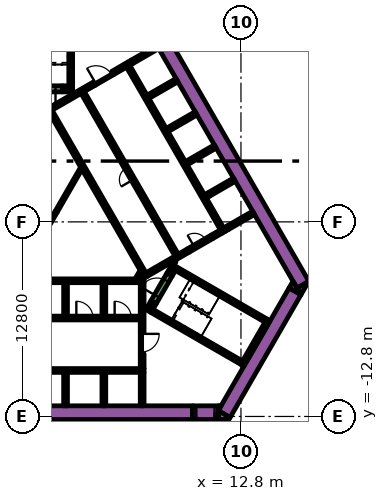
"""IFC4 building model, lengths in metres.
Left out: names, types, materials, properties, quantities, classifications, styles, units other than length and angle.
Written with IfcOpenShell. Run it as: python <this file> out.ifc"""

import sys

from ifc_helpers import new_model, si_unit, direction, frame, frame_2d, origin, place, context, subcontext, project, spatial, polyline, rectangle, outline, extrude, element, fill, save


model = new_model("IFC4")
c1 = context("Model", 3, precision=1e-05, world=origin(), true_north=direction((0.0, 1.0)))
c2 = subcontext(c1, "Body", "Model", "MODEL_VIEW")
j1 = project(units=[si_unit("LENGTHUNIT", "METRE"), si_unit("PLANEANGLEUNIT", "RADIAN")], contexts=[c1])
p1 = place(None, origin())
s1 = spatial("IfcSite", under=j1, at=p1, CompositionType="ELEMENT")
p2 = place(p1, origin())
s2 = spatial("IfcBuilding", under=s1, at=p2, CompositionType="ELEMENT")
p3 = place(p2, frame((0.0, 0.0, 6.0)))
s3 = spatial("IfcBuildingStorey", under=s2, at=p3, CompositionType="ELEMENT", Elevation=6.0)
p4 = place(p3, frame((6.776, 13.364, 0.0), z_axis=(0.0, 0.0, 1.0), x_axis=(0.500004177138, -0.8660229921, 0.0)))
e1 = element("IfcWall", 1, at=p4, inside=s3, PredefinedType="SOLIDWALL", context=c2, shape_type="SweptSolid", body=[
    extrude(rectangle(XDim=20.204, YDim=0.9, at=frame_2d((10.102, 0.0))), origin(), (0.0, 0.0, 1.0), 5.4),
])
p5 = place(p3, origin())
e2 = element("IfcWall", 2, at=p5, inside=s3, PredefinedType="SOLIDWALL", context=c2, shape_type="SweptSolid", body=[
    extrude(outline(polyline([(16.743, -4.8), (16.489, -4.36), (17.251, -3.92), (16.743, -4.8)])), origin(), (0.0, 0.0, 1.0), 5.4),
])
p6 = place(p3, frame((11.695, -12.644, 0.0), z_axis=(0.0, 0.0, 1.0), x_axis=(0.500010229568, 0.86601949766, 0.0)))
e3 = element("IfcWall", 3, at=p6, inside=s3, PredefinedType="SOLIDWALL", context=c2, shape_type="SweptSolid", body=[
    extrude(rectangle(XDim=9.326, YDim=0.9, at=frame_2d((4.663, 0.0))), origin(), (0.0, 0.0, 1.0), 5.4),
])
e4 = element("IfcWall", 4, at=p5, inside=s3, PredefinedType="SOLIDWALL", context=c2, shape_type="SweptSolid", body=[
    extrude(outline(polyline([(12.009, -13.0), (11.312, -13.0), (11.312, -12.425), (12.083, -12.871), (12.009, -13.0)])), origin(), (0.0, 0.0, 1.0), 5.4),
])
e5 = element("IfcWall", 5, at=p5, inside=s3, PredefinedType="SOLIDWALL", context=c2, shape_type="SweptSolid", body=[
    extrude(outline(polyline([(16.223, -3.9), (16.732, -4.78), (15.969, -4.34), (16.223, -3.9)])), origin(), (0.0, 0.0, 1.0), 5.4),
])
e6 = element("IfcWall", 6, at=p5, inside=s3, PredefinedType="SOLIDWALL", context=c2, shape_type="SweptSolid", body=[
    extrude(outline(polyline([(11.489, -12.1), (11.312, -12.407), (11.312, -12.1), (11.489, -12.1)])), origin(), (0.0, 0.0, 1.0), 5.4),
])
p7 = place(p3, frame((-12.019, -12.55, 0.0), z_axis=(0.0, 0.0, 1.0), x_axis=(1.0, 0.0, 0.0)))
e7 = element("IfcWall", 7, at=p7, inside=s3, PredefinedType="SOLIDWALL", context=c2, shape_type="SweptSolid", body=[
    extrude(rectangle(XDim=21.63, YDim=0.9, at=frame_2d((10.815, 0.0))), origin(), (0.0, 0.0, 1.0), 5.4),
])
p8 = place(p3, frame((12.885, -9.431, 0.0), z_axis=(0.0, 0.0, 1.0), x_axis=(0.500020560727, 0.866013532718, 0.0)))
e8 = element("IfcWall", 8, at=p8, inside=s3, PredefinedType="SOLIDWALL", context=c2, shape_type="SweptSolid", body=[
    extrude(rectangle(XDim=3.45, YDim=0.25, at=frame_2d((1.725, 0.0))), origin(), (0.0, 0.0, 1.0), 5.4),
])
p9 = place(p3, frame((12.84, -9.261, 0.0), z_axis=(0.0, 0.0, 1.0), x_axis=(-0.866013990052, 0.500019768644, 0.0)))
e9 = element("IfcWall", 9, at=p9, inside=s3, PredefinedType="SOLIDWALL", context=c2, shape_type="SweptSolid", body=[
    extrude(rectangle(XDim=6.8, YDim=0.25, at=frame_2d((3.4, 0.0))), origin(), (0.0, 0.0, 1.0), 5.4),
])
p10 = place(p3, frame((6.78, -5.906, 0.0), z_axis=(0.0, 0.0, 1.0), x_axis=(0.500223362819, 0.865896406789, 0.0)))
e10 = element("IfcWall", 10, at=p10, inside=s3, PredefinedType="SOLIDWALL", context=c2, shape_type="SweptSolid", body=[
    extrude(rectangle(XDim=0.675, YDim=0.25, at=frame_2d((0.337, 0.0))), origin(), (0.0, 0.0, 1.0), 5.4),
])
p11 = place(p3, frame((8.334, -2.964, 0.0), z_axis=(0.0, 0.0, 1.0), x_axis=(0.866016039709, -0.500016218704, 0.0)))
e11 = element("IfcWall", 11, at=p11, inside=s3, PredefinedType="SOLIDWALL", context=c2, shape_type="SweptSolid", body=[
    extrude(rectangle(XDim=7.05, YDim=0.25, at=frame_2d((3.525, 0.0))), origin(), (0.0, 0.0, 1.0), 5.4),
])
p12 = place(p3, frame((8.168, -3.503, 0.0), z_axis=(0.0, 0.0, 1.0), x_axis=(0.49972245349, 0.866185586049, 0.0)))
e12 = element("IfcWall", 12, at=p12, inside=s3, PredefinedType="SOLIDWALL", context=c2, shape_type="SweptSolid", body=[
    extrude(rectangle(XDim=0.425, YDim=0.25, at=frame_2d((0.212, 0.0))), origin(), (0.0, 0.0, 1.0), 5.4),
])
p13 = place(p3, frame((1.6, 8.95, 0.0), z_axis=(0.0, 0.0, 1.0), x_axis=(0.0, 1.0, 0.0)))
e13 = element("IfcWall", 13, at=p13, inside=s3, PredefinedType="SOLIDWALL", context=c2, shape_type="SweptSolid", body=[
    extrude(rectangle(XDim=6.8, YDim=0.25, at=frame_2d((3.4, 0.0))), origin(), (0.0, 0.0, 1.0), 5.4),
])
p14 = place(p3, frame((1.05, 8.825, 0.0), z_axis=(0.0, 0.0, 1.0), x_axis=(1.0, 0.0, 0.0)))
e14 = element("IfcWall", 14, at=p14, inside=s3, PredefinedType="SOLIDWALL", context=c2, shape_type="SweptSolid", body=[
    extrude(rectangle(XDim=0.675, YDim=0.25, at=frame_2d((0.337, 0.0))), origin(), (0.0, 0.0, 1.0), 5.4),
])
p15 = place(p3, frame((-6.425, -9.775, 0.0), z_axis=(0.0, 0.0, 1.0), x_axis=(1.0, 0.0, 0.0)))
e15 = element("IfcWall", 15, at=p15, inside=s3, PredefinedType="SOLIDWALL", context=c2, shape_type="SweptSolid", body=[
    extrude(rectangle(XDim=12.85, YDim=0.25, at=frame_2d((6.425, 0.0))), origin(), (0.0, 0.0, 1.0), 5.4),
])
p16 = place(p3, frame((-5.845, -3.875, 0.0), z_axis=(0.0, 0.0, 1.0), x_axis=(1.0, 0.0, 0.0)))
e16 = element("IfcWall", 16, at=p16, inside=s3, PredefinedType="SOLIDWALL", context=c2, shape_type="SweptSolid", body=[
    extrude(rectangle(XDim=12.27, YDim=0.25, at=frame_2d((6.135, 0.0))), origin(), (0.0, 0.0, 1.0), 5.4),
])
p17 = place(p3, frame((6.3, -7.27, 0.0), z_axis=(0.0, 0.0, 1.0), x_axis=(0.0, 1.0, 0.0)))
e17 = element("IfcWall", 17, at=p17, inside=s3, PredefinedType="SOLIDWALL", context=c2, shape_type="SweptSolid", body=[
    extrude(rectangle(XDim=3.27, YDim=0.25, at=frame_2d((1.635, 0.0))), origin(), (0.0, 0.0, 1.0), 5.4),
])
p18 = place(p3, frame((6.3, -8.672, 0.0), z_axis=(0.0, 0.0, 1.0), x_axis=(0.0, -1.0, 0.0)))
e18 = element("IfcWall", 18, at=p18, inside=s3, PredefinedType="SOLIDWALL", context=c2, shape_type="SweptSolid", body=[
    extrude(rectangle(XDim=0.978, YDim=0.25, at=frame_2d((0.489, 0.0))), origin(), (0.0, 0.0, 1.0), 5.4),
])
for number, where, z_axis, x_axis in (
    (19, (3.78, -4.0, 0.0), (0.0, 0.0, 1.0), (0.0, -1.0, 0.0)),
    (20, (1.26, -4.0, 0.0), (0.0, 0.0, 1.0), (0.0, -1.0, 0.0)),
):
    element("IfcWall", number, at=place(p3, frame(where, z_axis=z_axis, x_axis=x_axis)), inside=s3, PredefinedType="SOLIDWALL", context=c2, shape_type="SweptSolid", body=[
        extrude(rectangle(XDim=2.2, YDim=0.25, at=frame_2d((1.1, 0.0))), origin(), (0.0, 0.0, 1.0), 5.4),
    ])
for number, where, z_axis, x_axis in (
    (21, (6.3, -9.9, 0.0), (0.0, 0.0, 1.0), (0.0, -1.0, 0.0)),
    (22, (3.78, -9.9, 0.0), (0.0, 0.0, 1.0), (0.0, -1.0, 0.0)),
    (23, (1.26, -9.9, 0.0), (0.0, 0.0, 1.0), (0.0, -1.0, 0.0)),
):
    element("IfcWall", number, at=place(p3, frame(where, z_axis=z_axis, x_axis=x_axis)), inside=s3, PredefinedType="SOLIDWALL", context=c2, shape_type="SweptSolid", body=[
        extrude(rectangle(XDim=2.2, YDim=0.25, at=frame_2d((1.1, 0.0))), origin(), (0.0, 0.0, 1.0), 5.4),
    ])
p19 = place(p3, frame((11.678, -0.677, 0.0), z_axis=(0.0, 0.0, 1.0), x_axis=(-0.500003135297, 0.866023593612, 0.0)))
e24 = element("IfcWall", 24, at=p19, inside=s3, PredefinedType="SOLIDWALL", context=c2, shape_type="SweptSolid", body=[
    extrude(rectangle(XDim=12.85, YDim=0.25, at=frame_2d((6.425, 0.0))), origin(), (0.0, 0.0, 1.0), 5.4),
])
for number, where, z_axis, x_axis in (
    (25, (10.464, 1.677, 0.0), (0.0, 0.0, 1.0), (0.866, 0.5, 0.0)),
    (26, (11.894, -0.552, 0.0), (0.0, 0.0, 1.0), (-0.5, 0.866, 0.0)),
):
    element("IfcWall", number, at=place(p3, frame(where, z_axis=z_axis, x_axis=x_axis)), inside=s3, PredefinedType="SOLIDWALL", context=c2, shape_type="SweptSolid", body=[
        extrude(rectangle(XDim=0.25, YDim=0.25, at=frame_2d((0.125, 0.0))), origin(), (0.0, 0.0, 1.0), 5.4),
    ])
for number, where, z_axis, x_axis in (
    (27, (11.94, -0.381, 0.0), (0.0, 0.0, 1.0), (0.866, 0.5, 0.0)),
    (28, (12.369, 2.776, 0.0), (0.0, 0.0, 1.0), (-0.866, -0.5, 0.0)),
):
    element("IfcWall", number, at=place(p3, frame(where, z_axis=z_axis, x_axis=x_axis)), inside=s3, PredefinedType="SOLIDWALL", context=c2, shape_type="SweptSolid", body=[
        extrude(rectangle(XDim=1.95, YDim=0.25, at=frame_2d((0.975, 0.0))), origin(), (0.0, 0.0, 1.0), 5.4),
    ])
p20 = place(p3, frame((11.507, -0.631, 0.0), z_axis=(0.0, 0.0, 1.0), x_axis=(-0.866074517829, -0.49991492233, 0.0)))
e29 = element("IfcWall", 29, at=p20, inside=s3, PredefinedType="SOLIDWALL", context=c2, shape_type="SweptSolid", body=[
    extrude(rectangle(XDim=0.695, YDim=0.25, at=frame_2d((0.348, 0.0))), origin(), (0.0, 0.0, 1.0), 5.4),
])
e30 = element("IfcWall", 30, at=p5, inside=s3, PredefinedType="SOLIDWALL", context=c2, shape_type="SweptSolid", body=[
    extrude(outline(polyline([(6.552, -3.348), (6.677, -3.564), (6.46, -3.689), (4.897, -0.981), (0.332, 6.925), (0.335, 6.925), (0.335, 6.925), (0.335, 6.925), (0.335, 7.075), (0.335, 7.075), (0.335, 7.075), (0.245, 7.075), (0.079, 7.363), (0.035, 7.439), (0.252, 7.564), (0.377, 7.348), (6.552, -3.348)])), origin(), (0.0, 0.0, 1.0), 5.4),
])
p21 = place(p3, frame((4.358, 9.791, 0.0), z_axis=(0.0, 0.0, 1.0), x_axis=(0.866100000774, 0.49987077196, 0.0)))
e31 = element("IfcWall", 31, at=p21, inside=s3, PredefinedType="SOLIDWALL", context=c2, shape_type="SweptSolid", body=[
    extrude(rectangle(XDim=0.95, YDim=0.25, at=frame_2d((0.475, 0.0))), origin(), (0.0, 0.0, 1.0), 5.4),
])
p22 = place(p3, frame((0.314, 7.456, 0.0), z_axis=(0.0, 0.0, 1.0), x_axis=(0.866013897511, 0.50001992892, 0.0)))
e32 = element("IfcWall", 32, at=p22, inside=s3, PredefinedType="SOLIDWALL", context=c2, shape_type="SweptSolid", body=[
    extrude(rectangle(XDim=3.268, YDim=0.25, at=frame_2d((1.634, 0.0))), origin(), (0.0, 0.0, 1.0), 5.4),
])
p23 = place(p3, frame((6.614, -3.456, 0.0), z_axis=(0.0, 0.0, 1.0), x_axis=(0.86602447079, 0.500001615989, 0.0)))
e33 = element("IfcWall", 33, at=p23, inside=s3, PredefinedType="SOLIDWALL", context=c2, shape_type="SweptSolid", body=[
    extrude(rectangle(XDim=3.154, YDim=0.25, at=frame_2d((1.577, 0.0))), origin(), (0.0, 0.0, 1.0), 5.4),
])
p24 = place(p3, frame((5.469, 10.577, 0.0), z_axis=(0.0, 0.0, 1.0), x_axis=(0.499919672301, -0.866071776036, 0.0)))
e34 = element("IfcWall", 34, at=p24, inside=s3, PredefinedType="SOLIDWALL", context=c2, shape_type="SweptSolid", body=[
    extrude(rectangle(XDim=0.25, YDim=0.25, at=frame_2d((0.125, 0.0))), origin(), (0.0, 0.0, 1.0), 5.4),
])
p25 = place(p3, frame((5.64, 10.531, 0.0), z_axis=(0.0, 0.0, 1.0), x_axis=(0.866000020948, 0.500043961785, 0.0)))
e35 = element("IfcWall", 35, at=p25, inside=s3, PredefinedType="SOLIDWALL", context=c2, shape_type="SweptSolid", body=[
    extrude(rectangle(XDim=1.95, YDim=0.25, at=frame_2d((0.975, 0.0))), origin(), (0.0, 0.0, 1.0), 5.4),
])
for number, where, z_axis, x_axis in (
    (36, (8.589, 9.323, 0.0), (0.0, 0.0, 1.0), (-0.866, -0.5, 0.0)),
    (37, (7.944, 6.041, 0.0), (0.0, 0.0, 1.0), (0.866, 0.5, 0.0)),
    (38, (9.204, 3.859, 0.0), (0.0, 0.0, 1.0), (0.866, 0.5, 0.0)),
):
    element("IfcWall", number, at=place(p3, frame(where, z_axis=z_axis, x_axis=x_axis)), inside=s3, PredefinedType="SOLIDWALL", context=c2, shape_type="SweptSolid", body=[
        extrude(rectangle(XDim=2.2, YDim=0.25, at=frame_2d((1.1, 0.0))), origin(), (0.0, 0.0, 1.0), 5.4),
    ])
p26 = place(p3, frame((6.945, -5.222, 0.0), z_axis=(0.0, 0.0, 1.0), x_axis=(-0.499818422106, -0.866130212453, 0.0)))
e39 = element("IfcWall", 39, at=p26, inside=s3, PredefinedType="PARTITIONING", context=c2, shape_type="SweptSolid", body=[
    extrude(rectangle(XDim=0.514, YDim=0.15, at=frame_2d((0.257, 0.0))), origin(), (0.0, 0.0, 1.0), 4.5),
])
p27 = place(p3, frame((5.936, -3.718, 0.0), z_axis=(0.0, 0.0, 1.0), x_axis=(0.499890179513, 0.866088799389, 0.0)))
e40 = element("IfcWall", 40, at=p27, inside=s3, PredefinedType="PARTITIONING", context=c2, shape_type="SweptSolid", body=[
    extrude(rectangle(XDim=0.504, YDim=0.15, at=frame_2d((0.252, 0.0))), origin(), (0.0, 0.0, 1.0), 4.5),
])
p28 = place(p3, frame((8.459, -2.599, 0.0), z_axis=(0.0, 0.0, 1.0), x_axis=(-0.500041054325, -0.866001699761, 0.0)))
e41 = element("IfcWall", 41, at=p28, inside=s3, PredefinedType="PARTITIONING", context=c2, shape_type="SweptSolid", body=[
    extrude(rectangle(XDim=0.929, YDim=0.15, at=frame_2d((0.464, 0.0))), origin(), (0.0, 0.0, 1.0), 5.4),
])
p29 = place(p3, frame((0.645, 0.667, 0.0), z_axis=(0.0, 0.0, 1.0), x_axis=(0.499977178999, 0.866038579095, 0.0)))
e42 = element("IfcWall", 42, at=p29, inside=s3, PredefinedType="PARTITIONING", context=c2, shape_type="SweptSolid", body=[
    extrude(rectangle(XDim=3.263, YDim=0.15, at=frame_2d((1.632, 0.0))), origin(), (0.0, 0.0, 1.0), 4.5),
])
p30 = place(p3, frame((1.05, 8.625, 0.0), z_axis=(0.0, 0.0, 1.0), x_axis=(1.0, 0.0, 0.0)))
e43 = element("IfcWall", 43, at=p30, inside=s3, PredefinedType="PARTITIONING", context=c2, shape_type="SweptSolid", body=[
    extrude(rectangle(XDim=0.514, YDim=0.15, at=frame_2d((0.257, 0.0))), origin(), (0.0, 0.0, 1.0), 4.5),
])
p31 = place(p3, frame((-6.175, -6.325, 0.0), z_axis=(0.0, 0.0, 1.0), x_axis=(1.0, 0.0, 0.0)))
e44 = element("IfcWall", 44, at=p31, inside=s3, PredefinedType="SOLIDWALL", context=c2, shape_type="SweptSolid", body=[
    extrude(rectangle(XDim=12.35, YDim=0.25, at=frame_2d((6.175, 0.0))), origin(), (0.0, 0.0, 1.0), 5.4),
])
p32 = place(p31, frame((3.205, 0.0, 0.0)))
e45 = element("IfcOpeningElement", 45, at=p32, cuts=e44, PredefinedType="OPENING", context=c2, shape_type="SweptSolid", body=[
    extrude(rectangle(XDim=0.9, YDim=2.1, at=frame_2d((0.45, 1.05))), frame((0.0, 0.135, 0.0), z_axis=(0.0, -1.0, 0.0), x_axis=(1.0, 0.0, 0.0)), (0.0, 0.0, 1.0), 0.27),
])
p33 = place(p31, frame((8.145, 0.0, 0.0)))
e46 = element("IfcOpeningElement", 46, at=p33, cuts=e44, PredefinedType="OPENING", context=c2, shape_type="SweptSolid", body=[
    extrude(rectangle(XDim=1.1, YDim=2.1, at=frame_2d((0.55, 1.05))), frame((0.0, 0.135, 0.0), z_axis=(0.0, -1.0, 0.0), x_axis=(1.0, 0.0, 0.0)), (0.0, 0.0, 1.0), 0.27),
])
p34 = place(p31, frame((10.665, 0.0, 0.0)))
e47 = element("IfcOpeningElement", 47, at=p34, cuts=e44, PredefinedType="OPENING", context=c2, shape_type="SweptSolid", body=[
    extrude(rectangle(XDim=1.1, YDim=2.1, at=frame_2d((0.55, 1.05))), frame((0.0, 0.135, 0.0), z_axis=(0.0, -1.0, 0.0), x_axis=(1.0, 0.0, 0.0)), (0.0, 0.0, 1.0), 0.27),
])
p35 = place(p3, frame((8.565, -2.185, 0.0), z_axis=(0.0, 0.0, 1.0), x_axis=(-0.499997954832, 0.866026584559, 0.0)))
e48 = element("IfcWall", 48, at=p35, inside=s3, PredefinedType="SOLIDWALL", context=c2, shape_type="SweptSolid", body=[
    extrude(rectangle(XDim=12.35, YDim=0.25, at=frame_2d((6.175, 0.0))), origin(), (0.0, 0.0, 1.0), 5.4),
])
p36 = place(p35, frame((5.725, 0.0, 0.0)))
e49 = element("IfcOpeningElement", 49, at=p36, cuts=e48, PredefinedType="OPENING", context=c2, shape_type="SweptSolid", body=[
    extrude(rectangle(XDim=0.9, YDim=2.1, at=frame_2d((0.45, 1.05))), frame((0.0, 0.135, 0.0), z_axis=(0.0, -1.0, 0.0), x_axis=(1.0, 0.0, 0.0)), (0.0, 0.0, 1.0), 0.27),
])
p37 = place(p3, frame((7.053, -5.284, 0.0), z_axis=(0.0, 0.0, 1.0), x_axis=(0.500078061341, 0.865980330357, 0.0)))
e50 = element("IfcWall", 50, at=p37, inside=s3, PredefinedType="SOLIDWALL", context=c2, shape_type="SweptSolid", body=[
    extrude(rectangle(XDim=2.1, YDim=0.4, at=frame_2d((1.05, 0.0))), origin(), (0.0, 0.0, 1.0), 5.4),
])
p38 = place(p37, frame((0.45, 0.0, 0.0)))
e51 = element("IfcOpeningElement", 51, at=p38, cuts=e50, PredefinedType="OPENING", context=c2, shape_type="SweptSolid", body=[
    extrude(rectangle(XDim=1.2, YDim=2.1, at=frame_2d((0.6, 1.05))), frame((0.0, 0.21, 0.0), z_axis=(0.0, -1.0, 0.0), x_axis=(1.0, 0.0, 0.0)), (0.0, 0.0, 1.0), 0.42),
])
p39 = place(p3, frame((9.346, -1.879, 0.0), z_axis=(0.0, 0.0, 1.0), x_axis=(0.866047807691, 0.499961193289, 0.0)))
e52 = element("IfcWall", 52, at=p39, inside=s3, PredefinedType="SOLIDWALL", context=c2, shape_type="SweptSolid", body=[
    extrude(rectangle(XDim=1.8, YDim=0.25, at=frame_2d((0.9, 0.0))), origin(), (0.0, 0.0, 1.0), 5.4),
])
p40 = place(p39, frame((0.45, 0.0, 0.0)))
e53 = element("IfcOpeningElement", 53, at=p40, cuts=e52, PredefinedType="OPENING", context=c2, shape_type="SweptSolid", body=[
    extrude(rectangle(XDim=0.9, YDim=2.1, at=frame_2d((0.45, 1.05))), frame((0.0, 0.135, 0.0), z_axis=(0.0, -1.0, 0.0), x_axis=(1.0, 0.0, 0.0)), (0.0, 0.0, 1.0), 0.27),
])
p41 = place(p3, frame((1.05, 8.75, 0.0), z_axis=(0.0, 0.0, 1.0), x_axis=(-1.0, 0.0, 0.0)))
e54 = element("IfcWall", 54, at=p41, inside=s3, PredefinedType="SOLIDWALL", context=c2, shape_type="SweptSolid", body=[
    extrude(rectangle(XDim=2.1, YDim=0.4, at=frame_2d((1.05, 0.0))), origin(), (0.0, 0.0, 1.0), 5.4),
])
p42 = place(p41, frame((0.45, 0.0, 0.0)))
e55 = element("IfcOpeningElement", 55, at=p42, cuts=e54, PredefinedType="OPENING", context=c2, shape_type="SweptSolid", body=[
    extrude(rectangle(XDim=1.2, YDim=2.1, at=frame_2d((0.6, 1.05))), frame((0.0, 0.21, 0.0), z_axis=(0.0, -1.0, 0.0), x_axis=(1.0, 0.0, 0.0)), (0.0, 0.0, 1.0), 0.42),
])
p43 = place(p3, frame((6.22, -7.266, 0.0), z_axis=(0.0, 0.0, 1.0), x_axis=(0.0, -1.0, 0.0)))
e56 = element("IfcWall", 56, at=p43, inside=s3, PredefinedType="PARTITIONING", context=c2, shape_type="SweptSolid", body=[
    extrude(rectangle(XDim=1.4, YDim=0.09, at=frame_2d((0.7, 0.0))), origin(), (0.0, 0.0, 1.0), 4.5),
])
p44 = place(p43, frame((0.1, 0.0, 0.0)))
e57 = element("IfcOpeningElement", 57, at=p44, cuts=e56, PredefinedType="OPENING", context=c2, shape_type="SweptSolid", body=[
    extrude(rectangle(XDim=1.2, YDim=2.1, at=frame_2d((0.6, 1.05))), frame((0.0, 0.055, 0.0), z_axis=(0.0, -1.0, 0.0), x_axis=(1.0, 0.0, 0.0)), (0.0, 0.0, 1.0), 0.11),
])
p45 = place(p3, frame((3.183, 9.02, 0.0), z_axis=(0.0, 0.0, 1.0), x_axis=(0.866034573852, 0.49998411664, 0.0)))
e58 = element("IfcWall", 58, at=p45, inside=s3, PredefinedType="PARTITIONING", context=c2, shape_type="SweptSolid", body=[
    extrude(rectangle(XDim=1.4, YDim=0.09, at=frame_2d((0.7, 0.0))), origin(), (0.0, 0.0, 1.0), 4.5),
])
p46 = place(p45, frame((0.1, 0.0, 0.0)))
e59 = element("IfcOpeningElement", 59, at=p46, cuts=e58, PredefinedType="OPENING", context=c2, shape_type="SweptSolid", body=[
    extrude(rectangle(XDim=1.2, YDim=2.1, at=frame_2d((0.6, 1.05))), frame((0.0, 0.055, 0.0), z_axis=(0.0, -1.0, 0.0), x_axis=(1.0, 0.0, 0.0)), (0.0, 0.0, 1.0), 0.11),
])
p47 = place(p3, frame((11.312, -12.55, 0.0), z_axis=(0.0, 0.0, 1.0), x_axis=(-1.0, 0.0, 0.0)))
e60 = element("IfcWall", 60, at=p47, inside=s3, PredefinedType="SOLIDWALL", context=c2, shape_type="SweptSolid", body=[
    extrude(rectangle(XDim=1.7, YDim=0.9, at=frame_2d((0.85, 0.0))), origin(), (0.0, 0.0, 1.0), 5.4),
])
p48 = place(p47, frame((0.25, 0.0, 0.0)))
e61 = element("IfcOpeningElement", 61, at=p48, cuts=e60, PredefinedType="OPENING", context=c2, shape_type="SweptSolid", body=[
    extrude(rectangle(XDim=1.2, YDim=2.1, at=frame_2d((0.6, 1.05))), frame((0.0, 0.46, 0.0), z_axis=(0.0, -1.0, 0.0), x_axis=(1.0, 0.0, 0.0)), (0.0, 0.0, 1.0), 0.92),
])
p49 = place(p3, frame((-0.255, -0.892, 0.0), z_axis=(0.0, 0.0, 1.0), x_axis=(0.500062916607, 0.865989075817, 0.0)))
e62 = element("IfcWall", 62, at=p49, inside=s3, PredefinedType="PARTITIONING", context=c2, shape_type="SweptSolid", body=[
    extrude(rectangle(XDim=1.8, YDim=0.15, at=frame_2d((0.9, 0.0))), origin(), (0.0, 0.0, 1.0), 4.5),
])
p50 = place(p49, frame((0.45, 0.0, 0.0)))
e63 = element("IfcOpeningElement", 63, at=p50, cuts=e62, PredefinedType="OPENING", context=c2, shape_type="SweptSolid", body=[
    extrude(rectangle(XDim=0.9, YDim=2.1, at=frame_2d((0.45, 1.05))), frame((0.0, 0.085, 0.0), z_axis=(0.0, -1.0, 0.0), x_axis=(1.0, 0.0, 0.0)), (0.0, 0.0, 1.0), 0.17),
])
p51 = place(p33, origin())
e64 = element("IfcDoor", 64, at=p51, inside=s3, OperationType="DOUBLE_DOOR_SLIDING", PredefinedType="DOOR", context=c2, shape_type="SweptSolid", body=[
    extrude(rectangle(XDim=1.1, YDim=2.1, at=frame_2d((0.55, 1.05))), frame((0.0, 0.025, 0.0), z_axis=(0.0, -1.0, 0.0), x_axis=(1.0, 0.0, 0.0)), (0.0, 0.0, 1.0), 0.05),
])
fill(e46, e64)
p52 = place(p34, origin())
e65 = element("IfcDoor", 65, at=p52, inside=s3, OperationType="DOUBLE_DOOR_SLIDING", PredefinedType="DOOR", context=c2, shape_type="SweptSolid", body=[
    extrude(rectangle(XDim=1.1, YDim=2.1, at=frame_2d((0.55, 1.05))), frame((0.0, 0.025, 0.0), z_axis=(0.0, -1.0, 0.0), x_axis=(1.0, 0.0, 0.0)), (0.0, 0.0, 1.0), 0.05),
])
fill(e47, e65)
p53 = place(p36, origin())
e66 = element("IfcDoor", 66, at=p53, inside=s3, OperationType="SINGLE_SWING_LEFT", PredefinedType="DOOR", context=c2, shape_type="SweptSolid", body=[
    extrude(rectangle(XDim=0.9, YDim=2.1, at=frame_2d((0.45, 1.05))), frame((0.0, 0.025, 0.0), z_axis=(0.0, -1.0, 0.0), x_axis=(1.0, 0.0, 0.0)), (0.0, 0.0, 1.0), 0.05),
])
fill(e49, e66)
p54 = place(p38, origin())
e67 = element("IfcDoor", 67, at=p54, inside=s3, OperationType="SINGLE_SWING_LEFT", PredefinedType="DOOR", context=c2, shape_type="SweptSolid", body=[
    extrude(rectangle(XDim=1.2, YDim=2.1, at=frame_2d((0.6, 1.05))), frame((0.0, 0.025, 0.0), z_axis=(0.0, -1.0, 0.0), x_axis=(1.0, 0.0, 0.0)), (0.0, 0.0, 1.0), 0.05),
])
fill(e51, e67)
p55 = place(p40, origin())
e68 = element("IfcDoor", 68, at=p55, inside=s3, OperationType="SINGLE_SWING_LEFT", PredefinedType="DOOR", context=c2, shape_type="SweptSolid", body=[
    extrude(rectangle(XDim=0.9, YDim=2.1, at=frame_2d((0.45, 1.05))), frame((0.0, 0.025, 0.0), z_axis=(0.0, -1.0, 0.0), x_axis=(1.0, 0.0, 0.0)), (0.0, 0.0, 1.0), 0.05),
])
fill(e53, e68)
p56 = place(p42, origin())
e69 = element("IfcDoor", 69, at=p56, inside=s3, OperationType="SINGLE_SWING_LEFT", PredefinedType="DOOR", context=c2, shape_type="SweptSolid", body=[
    extrude(rectangle(XDim=1.2, YDim=2.1, at=frame_2d((0.6, 1.05))), frame((0.0, 0.025, 0.0), z_axis=(0.0, -1.0, 0.0), x_axis=(1.0, 0.0, 0.0)), (0.0, 0.0, 1.0), 0.05),
])
fill(e55, e69)
p57 = place(p44, origin())
e70 = element("IfcDoor", 70, at=p57, inside=s3, OperationType="SINGLE_SWING_LEFT", PredefinedType="DOOR", context=c2, shape_type="SweptSolid", body=[
    extrude(rectangle(XDim=1.2, YDim=2.1, at=frame_2d((0.6, 1.05))), frame((0.0, 0.025, 0.0), z_axis=(0.0, -1.0, 0.0), x_axis=(1.0, 0.0, 0.0)), (0.0, 0.0, 1.0), 0.05),
])
fill(e57, e70)
p58 = place(p46, origin())
e71 = element("IfcDoor", 71, at=p58, inside=s3, OperationType="SINGLE_SWING_LEFT", PredefinedType="DOOR", context=c2, shape_type="SweptSolid", body=[
    extrude(rectangle(XDim=1.2, YDim=2.1, at=frame_2d((0.6, 1.05))), frame((0.0, 0.025, 0.0), z_axis=(0.0, -1.0, 0.0), x_axis=(1.0, 0.0, 0.0)), (0.0, 0.0, 1.0), 0.05),
])
fill(e59, e71)
p59 = place(p48, origin())
e72 = element("IfcDoor", 72, at=p59, inside=s3, OperationType="SINGLE_SWING_LEFT", PredefinedType="DOOR", context=c2, shape_type="SweptSolid", body=[
    extrude(rectangle(XDim=1.2, YDim=2.1, at=frame_2d((0.6, 1.05))), frame((0.0, 0.025, 0.0), z_axis=(0.0, -1.0, 0.0), x_axis=(1.0, 0.0, 0.0)), (0.0, 0.0, 1.0), 0.05),
])
fill(e61, e72)
p60 = place(p50, origin())
e73 = element("IfcDoor", 73, at=p60, inside=s3, OperationType="SINGLE_SWING_LEFT", PredefinedType="DOOR", context=c2, shape_type="SweptSolid", body=[
    extrude(rectangle(XDim=0.9, YDim=2.1, at=frame_2d((0.45, 1.05))), frame((0.0, 0.025, 0.0), z_axis=(0.0, -1.0, 0.0), x_axis=(1.0, 0.0, 0.0)), (0.0, 0.0, 1.0), 0.05),
])
fill(e63, e73)
save(model, sys.argv[1])
